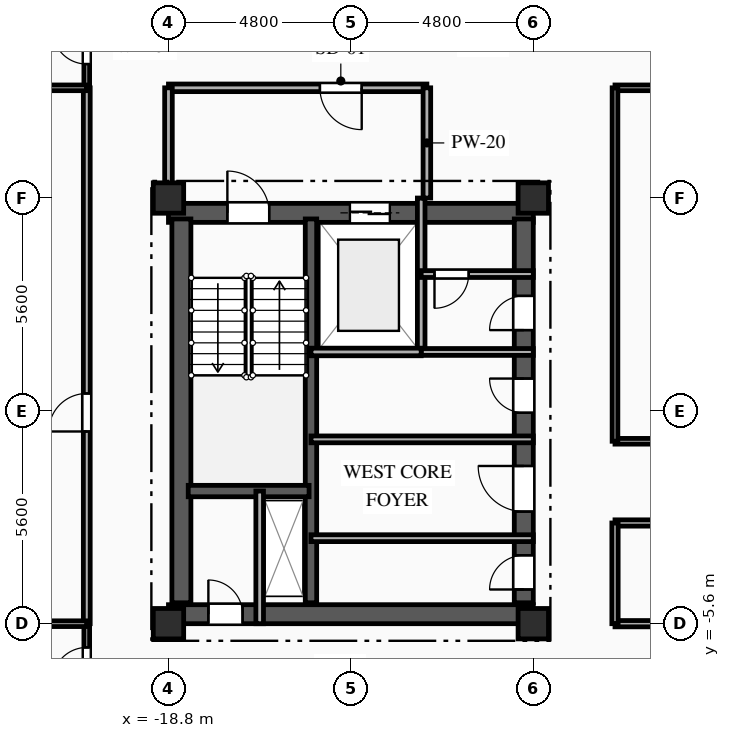
"""IFC4 building model, lengths in metres.
Left out: names, types, materials, properties, quantities, classifications, styles, units other than length and angle.
Written with IfcOpenShell. Run it as: python <this file> out.ifc"""

import sys

from ifc_helpers import new_model, si_unit, direction, frame, frame_2d, origin, origin_2d, place, context, subcontext, project, spatial, rectangle, extrude, element, fill, save


model = new_model("IFC4")
c1 = context("Model", 3, precision=1e-05, world=origin(), true_north=direction((0.0, 1.0)))
c2 = subcontext(c1, "Body", "Model", "MODEL_VIEW")
j1 = project(units=[si_unit("LENGTHUNIT", "METRE"), si_unit("PLANEANGLEUNIT", "RADIAN")], contexts=[c1])
p1 = place(None, origin())
s1 = spatial("IfcSite", under=j1, at=p1, CompositionType="ELEMENT")
p2 = place(p1, origin())
s2 = spatial("IfcBuilding", under=s1, at=p2, CompositionType="ELEMENT")
p3 = place(p2, frame((0.0, 0.0, 189.7)))
s3 = spatial("IfcBuildingStorey", under=s2, at=p3, CompositionType="ELEMENT", Elevation=189.7)
for number, where, z_axis, x_axis in (
    (1, (-18.8, -5.6, 0.0), (0.0, 0.0, 1.0), (1.0, 0.0, 0.0)),
    (2, (-18.8, 5.6, 0.0), (0.0, 0.0, 1.0), (1.0, 0.0, 0.0)),
    (3, (-9.2, -5.6, 0.0), (0.0, 0.0, 1.0), (1.0, 0.0, 0.0)),
    (4, (-9.2, 5.6, 0.0), (0.0, 0.0, 1.0), (1.0, 0.0, 0.0)),
):
    element("IfcColumn", number, at=place(p3, frame(where, z_axis=z_axis, x_axis=x_axis)), inside=s3, PredefinedType="COLUMN", context=c2, shape_type="SweptSolid", body=[
        extrude(rectangle(XDim=0.8, YDim=0.8, at=origin_2d()), origin(), (0.0, 0.0, 1.0), 3.35),
    ])
p4 = place(p3, frame((-18.8, 5.21, 0.0), z_axis=(0.0, 0.0, 1.0), x_axis=(1.0, 0.0, 0.0)))
e5 = element("IfcWall", 5, at=p4, inside=s3, PredefinedType="SHEAR", context=c2, shape_type="SweptSolid", body=[
    extrude(rectangle(XDim=9.6, YDim=0.5, at=frame_2d((4.8, 0.0))), origin(), (0.0, 0.0, 1.0), 3.04),
])
p5 = place(p4, frame((1.55, 0.0, 0.0)))
e6 = element("IfcOpeningElement", 6, at=p5, cuts=e5, PredefinedType="OPENING", context=c2, shape_type="SweptSolid", body=[
    extrude(rectangle(XDim=1.1, YDim=2.15, at=frame_2d((0.55, 1.075))), frame((0.0, 0.26, 0.0), z_axis=(0.0, -1.0, 0.0), x_axis=(1.0, 0.0, 0.0)), (0.0, 0.0, 1.0), 0.52),
])
p6 = place(p4, frame((4.775, 0.0, 0.0)))
e7 = element("IfcOpeningElement", 7, at=p6, cuts=e5, PredefinedType="OPENING", context=c2, shape_type="SweptSolid", body=[
    extrude(rectangle(XDim=1.05, YDim=2.1, at=frame_2d((0.525, 1.05))), frame((0.0, 0.26, 0.0), z_axis=(0.0, -1.0, 0.0), x_axis=(1.0, 0.0, 0.0)), (0.0, 0.0, 1.0), 0.52),
])
p7 = place(p3, frame((-18.8, -5.35, 0.0), z_axis=(0.0, 0.0, 1.0), x_axis=(1.0, 0.0, 0.0)))
e8 = element("IfcWall", 8, at=p7, inside=s3, PredefinedType="SHEAR", context=c2, shape_type="SweptSolid", body=[
    extrude(rectangle(XDim=9.6, YDim=0.5, at=frame_2d((4.8, 0.0))), origin(), (0.0, 0.0, 1.0), 3.04),
])
p8 = place(p7, frame((1.05, 0.0, 0.0)))
e9 = element("IfcOpeningElement", 9, at=p8, cuts=e8, PredefinedType="OPENING", context=c2, shape_type="SweptSolid", body=[
    extrude(rectangle(XDim=0.9, YDim=2.1, at=frame_2d((0.45, 1.05))), frame((0.0, 0.26, 0.0), z_axis=(0.0, -1.0, 0.0), x_axis=(1.0, 0.0, 0.0)), (0.0, 0.0, 1.0), 0.52),
])
p9 = place(p3, frame((-18.46, -5.05, 0.0), z_axis=(0.0, 0.0, 1.0), x_axis=(0.0, 1.0, 0.0)))
e10 = element("IfcWall", 10, at=p9, inside=s3, PredefinedType="SHEAR", context=c2, shape_type="SweptSolid", body=[
    extrude(rectangle(XDim=10.1, YDim=0.5, at=frame_2d((5.05, 0.0))), origin(), (0.0, 0.0, 1.0), 3.04),
])
p10 = place(p3, frame((-9.45, -5.05, 0.0), z_axis=(0.0, 0.0, 1.0), x_axis=(0.0, 1.0, 0.0)))
e11 = element("IfcWall", 11, at=p10, inside=s3, PredefinedType="SHEAR", context=c2, shape_type="SweptSolid", body=[
    extrude(rectangle(XDim=10.1, YDim=0.5, at=frame_2d((5.05, 0.0))), origin(), (0.0, 0.0, 1.0), 3.04),
])
p11 = place(p10, frame((7.175, 0.0, 0.0)))
e12 = element("IfcOpeningElement", 12, at=p11, cuts=e11, PredefinedType="OPENING", context=c2, shape_type="SweptSolid", body=[
    extrude(rectangle(XDim=0.9, YDim=2.1, at=frame_2d((0.45, 1.05))), frame((0.0, 0.26, 0.0), z_axis=(0.0, -1.0, 0.0), x_axis=(1.0, 0.0, 0.0)), (0.0, 0.0, 1.0), 0.52),
])
p12 = place(p10, frame((2.4, 0.0, 0.0)))
e13 = element("IfcOpeningElement", 13, at=p12, cuts=e11, PredefinedType="OPENING", context=c2, shape_type="SweptSolid", body=[
    extrude(rectangle(XDim=1.2, YDim=2.15, at=frame_2d((0.6, 1.075))), frame((0.0, 0.26, 0.0), z_axis=(0.0, -1.0, 0.0), x_axis=(1.0, 0.0, 0.0)), (0.0, 0.0, 1.0), 0.52),
])
p13 = place(p10, frame((0.35, 0.0, 0.0)))
e14 = element("IfcOpeningElement", 14, at=p13, cuts=e11, PredefinedType="OPENING", context=c2, shape_type="SweptSolid", body=[
    extrude(rectangle(XDim=0.9, YDim=2.1, at=frame_2d((0.45, 1.05))), frame((0.0, 0.26, 0.0), z_axis=(0.0, -1.0, 0.0), x_axis=(1.0, 0.0, 0.0)), (0.0, 0.0, 1.0), 0.52),
])
p14 = place(p10, frame((5.0, 0.0, 0.0)))
e15 = element("IfcOpeningElement", 15, at=p14, cuts=e11, PredefinedType="OPENING", context=c2, shape_type="SweptSolid", body=[
    extrude(rectangle(XDim=0.9, YDim=2.1, at=frame_2d((0.45, 1.05))), frame((0.0, 0.26, 0.0), z_axis=(0.0, -1.0, 0.0), x_axis=(1.0, 0.0, 0.0)), (0.0, 0.0, 1.0), 0.52),
])
p15 = place(p3, frame((-15.05, -5.05, 0.0), z_axis=(0.0, 0.0, 1.0), x_axis=(0.0, 1.0, 0.0)))
e16 = element("IfcWall", 16, at=p15, inside=s3, PredefinedType="SHEAR", context=c2, shape_type="SweptSolid", body=[
    extrude(rectangle(XDim=10.1, YDim=0.3, at=frame_2d((5.05, 0.0))), origin(), (0.0, 0.0, 1.0), 3.04),
])
p16 = place(p3, frame((-18.28, -2.11, 0.0), z_axis=(0.0, 0.0, 1.0), x_axis=(1.0, 0.0, 0.0)))
e17 = element("IfcWall", 17, at=p16, inside=s3, PredefinedType="SHEAR", context=c2, shape_type="SweptSolid", body=[
    extrude(rectangle(XDim=3.18, YDim=0.3, at=frame_2d((1.59, 0.0))), origin(), (0.0, 0.0, 1.0), 3.04),
])
p17 = place(p3, frame((-16.4, -5.6, 0.0), z_axis=(0.0, 0.0, 1.0), x_axis=(0.0, 1.0, 0.0)))
e18 = element("IfcWall", 18, at=p17, inside=s3, PredefinedType="PARTITIONING", context=c2, shape_type="SweptSolid", body=[
    extrude(rectangle(XDim=3.49, YDim=0.2, at=frame_2d((1.745, 0.0))), origin(), (0.0, 0.0, 1.0), 3.04),
])
p18 = place(p3, frame((-12.15, 1.55, 0.0), z_axis=(0.0, 0.0, 1.0), x_axis=(0.0, 1.0, 0.0)))
e19 = element("IfcWall", 19, at=p18, inside=s3, PredefinedType="PARTITIONING", context=c2, shape_type="SweptSolid", body=[
    extrude(rectangle(XDim=2.05, YDim=0.2, at=frame_2d((1.025, 0.0))), origin(), (0.0, 0.0, 1.0), 3.04),
])
p19 = place(p3, frame((-12.15, 3.6, 0.0), z_axis=(0.0, 0.0, 1.0), x_axis=(0.0, 1.0, 0.0)))
e20 = element("IfcWall", 20, at=p19, inside=s3, PredefinedType="PARTITIONING", context=c2, shape_type="SweptSolid", body=[
    extrude(rectangle(XDim=2.0, YDim=0.2, at=frame_2d((1.0, 0.0))), origin(), (0.0, 0.0, 1.0), 3.04),
])
p20 = place(p3, frame((-12.0, 8.5, 0.0), z_axis=(0.0, 0.0, 1.0), x_axis=(-1.0, 0.0, 0.0)))
e21 = element("IfcWall", 21, at=p20, inside=s3, PredefinedType="PARTITIONING", context=c2, shape_type="SweptSolid", body=[
    extrude(rectangle(XDim=6.8, YDim=0.2, at=frame_2d((3.4, 0.0))), origin(), (0.0, 0.0, 1.0), 3.04),
])
p21 = place(p20, frame((1.715, 0.0, 0.0)))
e22 = element("IfcOpeningElement", 22, at=p21, cuts=e21, PredefinedType="OPENING", context=c2, shape_type="SweptSolid", body=[
    extrude(rectangle(XDim=1.1, YDim=2.15, at=frame_2d((0.55, 1.075))), frame((0.0, 0.11, 0.0), z_axis=(0.0, -1.0, 0.0), x_axis=(1.0, 0.0, 0.0)), (0.0, 0.0, 1.0), 0.22),
])
p22 = place(p3, frame((-18.8, 8.5, 0.0), z_axis=(0.0, 0.0, 1.0), x_axis=(0.0, -1.0, 0.0)))
e23 = element("IfcWall", 23, at=p22, inside=s3, PredefinedType="PARTITIONING", context=c2, shape_type="SweptSolid", body=[
    extrude(rectangle(XDim=2.9, YDim=0.2, at=frame_2d((1.45, 0.0))), origin(), (0.0, 0.0, 1.0), 2.665),
])
p23 = place(p3, frame((-12.0, 5.6, 0.0), z_axis=(0.0, 0.0, 1.0), x_axis=(0.0, 1.0, 0.0)))
e24 = element("IfcWall", 24, at=p23, inside=s3, PredefinedType="PARTITIONING", context=c2, shape_type="SweptSolid", body=[
    extrude(rectangle(XDim=2.9, YDim=0.2, at=frame_2d((1.45, 0.0))), origin(), (0.0, 0.0, 1.0), 3.04),
])
p24 = place(p3, frame((-9.2, 3.6, 0.0), z_axis=(0.0, 0.0, 1.0), x_axis=(-1.0, 0.0, 0.0)))
e25 = element("IfcWall", 25, at=p24, inside=s3, PredefinedType="PARTITIONING", context=c2, shape_type="SweptSolid", body=[
    extrude(rectangle(XDim=2.95, YDim=0.18, at=frame_2d((1.475, 0.0))), origin(), (0.0, 0.0, 1.0), 3.04),
])
p25 = place(p24, frame((1.7, 0.0, 0.0)))
e26 = element("IfcOpeningElement", 26, at=p25, cuts=e25, PredefinedType="OPENING", context=c2, shape_type="SweptSolid", body=[
    extrude(rectangle(XDim=0.9, YDim=2.1, at=frame_2d((0.45, 1.05))), frame((0.0, 0.1, 0.0), z_axis=(0.0, -1.0, 0.0), x_axis=(1.0, 0.0, 0.0)), (0.0, 0.0, 1.0), 0.2),
])
p26 = place(p3, frame((-12.15, 1.55, 0.0), z_axis=(0.0, 0.0, 1.0), x_axis=(1.0, 0.0, 0.0)))
e27 = element("IfcWall", 27, at=p26, inside=s3, PredefinedType="PARTITIONING", context=c2, shape_type="SweptSolid", body=[
    extrude(rectangle(XDim=2.95, YDim=0.18, at=frame_2d((1.475, 0.0))), origin(), (0.0, 0.0, 1.0), 3.04),
])
p27 = place(p3, frame((-15.05, -3.35, 0.0), z_axis=(0.0, 0.0, 1.0), x_axis=(1.0, 0.0, 0.0)))
e28 = element("IfcWall", 28, at=p27, inside=s3, PredefinedType="PARTITIONING", context=c2, shape_type="SweptSolid", body=[
    extrude(rectangle(XDim=5.85, YDim=0.18, at=frame_2d((2.925, 0.0))), origin(), (0.0, 0.0, 1.0), 2.755),
])
p28 = place(p3, frame((-9.2, -0.75, 0.0), z_axis=(0.0, 0.0, 1.0), x_axis=(-1.0, 0.0, 0.0)))
e29 = element("IfcWall", 29, at=p28, inside=s3, PredefinedType="PARTITIONING", context=c2, shape_type="SweptSolid", body=[
    extrude(rectangle(XDim=5.85, YDim=0.18, at=frame_2d((2.925, 0.0))), origin(), (0.0, 0.0, 1.0), 3.04),
])
p29 = place(p3, frame((-20.95, 8.5, 0.0), z_axis=(0.0, 0.0, 1.0), x_axis=(0.0, 1.0, 0.0)))
e30 = element("IfcWall", 30, at=p29, inside=s3, PredefinedType="PARTITIONING", context=c2, shape_type="SweptSolid", body=[
    extrude(rectangle(XDim=2.15, YDim=0.15, at=frame_2d((1.075, 0.0))), origin(), (0.0, 0.0, 1.0), 3.04),
])
p30 = place(p29, frame((0.625, 0.0, 0.0)))
e31 = element("IfcOpeningElement", 31, at=p30, cuts=e30, PredefinedType="OPENING", context=c2, shape_type="SweptSolid", body=[
    extrude(rectangle(XDim=0.9, YDim=2.1, at=frame_2d((0.45, 1.05))), frame((0.0, 0.085, 0.0), z_axis=(0.0, -1.0, 0.0), x_axis=(1.0, 0.0, 0.0)), (0.0, 0.0, 1.0), 0.17),
])
p31 = place(p3, frame((0.0, 8.5, 0.0), z_axis=(0.0, 0.0, 1.0), x_axis=(-1.0, 0.0, 0.0)))
e32 = element("IfcWall", 32, at=p31, inside=s3, PredefinedType="PARTITIONING", context=c2, shape_type="SweptSolid", body=[
    extrude(rectangle(XDim=7.05, YDim=0.15, at=frame_2d((3.525, 0.0))), origin(), (0.0, 0.0, 1.0), 3.04),
])
p32 = place(p3, frame((-20.95, -7.75, 0.0), z_axis=(0.0, 0.0, 1.0), x_axis=(0.0, 1.0, 0.0)))
e33 = element("IfcWall", 33, at=p32, inside=s3, PredefinedType="PARTITIONING", context=c2, shape_type="SweptSolid", body=[
    extrude(rectangle(XDim=2.15, YDim=0.15, at=frame_2d((1.075, 0.0))), origin(), (0.0, 0.0, 1.0), 3.04),
])
p33 = place(p32, frame((0.625, 0.0, 0.0)))
e34 = element("IfcOpeningElement", 34, at=p33, cuts=e33, PredefinedType="OPENING", context=c2, shape_type="SweptSolid", body=[
    extrude(rectangle(XDim=0.9, YDim=2.1, at=frame_2d((0.45, 1.05))), frame((0.0, 0.085, 0.0), z_axis=(0.0, -1.0, 0.0), x_axis=(1.0, 0.0, 0.0)), (0.0, 0.0, 1.0), 0.17),
])
p34 = place(p3, frame((-7.05, -5.6, 0.0), z_axis=(0.0, 0.0, 1.0), x_axis=(1.0, 0.0, 0.0)))
e35 = element("IfcWall", 35, at=p34, inside=s3, PredefinedType="PARTITIONING", context=c2, shape_type="SweptSolid", body=[
    extrude(rectangle(XDim=7.05, YDim=0.165, at=frame_2d((3.525, 0.0))), origin(), (0.0, 0.0, 1.0), 2.525),
])
p35 = place(p34, frame((4.728, 0.0, 0.0)))
e36 = element("IfcOpeningElement", 36, at=p35, cuts=e35, PredefinedType="OPENING", context=c2, shape_type="SweptSolid", body=[
    extrude(rectangle(XDim=1.15, YDim=2.15, at=frame_2d((0.575, 1.075))), frame((0.0, 0.093, 0.0), z_axis=(0.0, -1.0, 0.0), x_axis=(1.0, 0.0, 0.0)), (0.0, 0.0, 1.0), 0.185),
])
p36 = place(p3, frame((-20.95, -5.6, 0.0), z_axis=(0.0, 0.0, 1.0), x_axis=(0.0, 1.0, 0.0)))
e37 = element("IfcWall", 37, at=p36, inside=s3, PredefinedType="PARTITIONING", context=c2, shape_type="SweptSolid", body=[
    extrude(rectangle(XDim=14.1, YDim=0.18, at=frame_2d((7.05, 0.0))), origin(), (0.0, 0.0, 1.0), 3.04),
])
p37 = place(p36, frame((5.058, 0.0, 0.0)))
e38 = element("IfcOpeningElement", 38, at=p37, cuts=e37, PredefinedType="OPENING", context=c2, shape_type="SweptSolid", body=[
    extrude(rectangle(XDim=1.0, YDim=2.15, at=frame_2d((0.5, 1.075))), frame((0.0, 0.1, 0.0), z_axis=(0.0, -1.0, 0.0), x_axis=(1.0, 0.0, 0.0)), (0.0, 0.0, 1.0), 0.2),
])
p38 = place(p3, frame((-7.05, -0.8, 0.0), z_axis=(0.0, 0.0, 1.0), x_axis=(1.0, 0.0, 0.0)))
e39 = element("IfcWall", 39, at=p38, inside=s3, PredefinedType="PARTITIONING", context=c2, shape_type="SweptSolid", body=[
    extrude(rectangle(XDim=14.1, YDim=0.15, at=frame_2d((7.05, 0.0))), origin(), (0.0, 0.0, 1.0), 3.04),
])
p39 = place(p38, frame((6.525, 0.0, 0.0)))
e40 = element("IfcOpeningElement", 40, at=p39, cuts=e39, PredefinedType="OPENING", context=c2, shape_type="SweptSolid", body=[
    extrude(rectangle(XDim=1.05, YDim=2.15, at=frame_2d((0.525, 1.075))), frame((0.0, 0.085, 0.0), z_axis=(0.0, -1.0, 0.0), x_axis=(1.0, 0.0, 0.0)), (0.0, 0.0, 1.0), 0.17),
])
p40 = place(p3, frame((0.0, -2.95, 0.0), z_axis=(0.0, 0.0, 1.0), x_axis=(-1.0, 0.0, 0.0)))
e41 = element("IfcWall", 41, at=p40, inside=s3, PredefinedType="PARTITIONING", context=c2, shape_type="SweptSolid", body=[
    extrude(rectangle(XDim=7.05, YDim=0.165, at=frame_2d((3.525, 0.0))), origin(), (0.0, 0.0, 1.0), 3.04),
])
p41 = place(p3, frame((-7.05, 8.5, 0.0), z_axis=(0.0, 0.0, 1.0), x_axis=(0.0, -1.0, 0.0)))
e42 = element("IfcWall", 42, at=p41, inside=s3, PredefinedType="PARTITIONING", context=c2, shape_type="SweptSolid", body=[
    extrude(rectangle(XDim=9.3, YDim=0.15, at=frame_2d((4.65, 0.0))), origin(), (0.0, 0.0, 1.0), 3.04),
])
p42 = place(p3, frame((-7.05, -2.95, 0.0), z_axis=(0.0, 0.0, 1.0), x_axis=(0.0, -1.0, 0.0)))
e43 = element("IfcWall", 43, at=p42, inside=s3, PredefinedType="PARTITIONING", context=c2, shape_type="SweptSolid", body=[
    extrude(rectangle(XDim=2.65, YDim=0.165, at=frame_2d((1.325, 0.0))), origin(), (0.0, 0.0, 1.0), 3.04),
])
p43 = place(p3, frame((-23.6, 8.5, 0.0), z_axis=(0.0, 0.0, 1.0), x_axis=(1.0, 0.0, 0.0)))
e44 = element("IfcWall", 44, at=p43, inside=s3, PredefinedType="PARTITIONING", context=c2, shape_type="SweptSolid", body=[
    extrude(rectangle(XDim=2.65, YDim=0.15, at=frame_2d((1.325, 0.0))), origin(), (0.0, 0.0, 1.0), 3.04),
])
p44 = place(p43, frame((0.635, 0.0, 0.0)))
e45 = element("IfcOpeningElement", 45, at=p44, cuts=e44, PredefinedType="OPENING", context=c2, shape_type="SweptSolid", body=[
    extrude(rectangle(XDim=1.05, YDim=2.15, at=frame_2d((0.525, 1.075))), frame((0.0, 0.085, 0.0), z_axis=(0.0, -1.0, 0.0), x_axis=(1.0, 0.0, 0.0)), (0.0, 0.0, 1.0), 0.17),
])
p45 = place(p3, frame((-20.95, -5.6, 0.0), z_axis=(0.0, 0.0, 1.0), x_axis=(-1.0, 0.0, 0.0)))
e46 = element("IfcWall", 46, at=p45, inside=s3, PredefinedType="PARTITIONING", context=c2, shape_type="SweptSolid", body=[
    extrude(rectangle(XDim=2.65, YDim=0.15, at=frame_2d((1.325, 0.0))), origin(), (0.0, 0.0, 1.0), 3.04),
])
p46 = place(p45, frame((0.965, 0.0, 0.0)))
e47 = element("IfcOpeningElement", 47, at=p46, cuts=e46, PredefinedType="OPENING", context=c2, shape_type="SweptSolid", body=[
    extrude(rectangle(XDim=1.05, YDim=2.15, at=frame_2d((0.525, 1.075))), frame((0.0, 0.085, 0.0), z_axis=(0.0, -1.0, 0.0), x_axis=(1.0, 0.0, 0.0)), (0.0, 0.0, 1.0), 0.17),
])
p47 = place(p3, frame((-15.05, 1.55, 0.0), z_axis=(0.0, 0.0, 1.0), x_axis=(1.0, 0.0, 0.0)))
e48 = element("IfcWall", 48, at=p47, inside=s3, PredefinedType="PARTITIONING", context=c2, shape_type="SweptSolid", body=[
    extrude(rectangle(XDim=2.9, YDim=0.2, at=frame_2d((1.45, 0.0))), origin(), (0.0, 0.0, 1.0), 3.04),
])
p48 = place(p5, origin())
e49 = element("IfcDoor", 49, at=p48, inside=s3, OperationType="SINGLE_SWING_LEFT", PredefinedType="DOOR", context=c2, shape_type="SweptSolid", body=[
    extrude(rectangle(XDim=1.1, YDim=2.15, at=frame_2d((0.55, 1.075))), frame((0.0, 0.025, 0.0), z_axis=(0.0, -1.0, 0.0), x_axis=(1.0, 0.0, 0.0)), (0.0, 0.0, 1.0), 0.05),
])
fill(e6, e49)
p49 = place(p6, origin())
e50 = element("IfcDoor", 50, at=p49, inside=s3, OperationType="DOUBLE_DOOR_SLIDING", PredefinedType="DOOR", context=c2, shape_type="SweptSolid", body=[
    extrude(rectangle(XDim=1.05, YDim=2.1, at=frame_2d((0.525, 1.05))), frame((0.0, 0.025, 0.0), z_axis=(0.0, -1.0, 0.0), x_axis=(1.0, 0.0, 0.0)), (0.0, 0.0, 1.0), 0.05),
])
fill(e7, e50)
p50 = place(p8, origin())
e51 = element("IfcDoor", 51, at=p50, inside=s3, OperationType="SINGLE_SWING_LEFT", PredefinedType="DOOR", context=c2, shape_type="SweptSolid", body=[
    extrude(rectangle(XDim=0.9, YDim=2.1, at=frame_2d((0.45, 1.05))), frame((0.0, 0.025, 0.0), z_axis=(0.0, -1.0, 0.0), x_axis=(1.0, 0.0, 0.0)), (0.0, 0.0, 1.0), 0.05),
])
fill(e9, e51)
p51 = place(p21, origin())
e52 = element("IfcDoor", 52, at=p51, inside=s3, OperationType="SINGLE_SWING_LEFT", PredefinedType="DOOR", context=c2, shape_type="SweptSolid", body=[
    extrude(rectangle(XDim=1.1, YDim=2.15, at=frame_2d((0.55, 1.075))), frame((0.0, 0.025, 0.0), z_axis=(0.0, -1.0, 0.0), x_axis=(1.0, 0.0, 0.0)), (0.0, 0.0, 1.0), 0.05),
])
fill(e22, e52)
p52 = place(p25, origin())
e53 = element("IfcDoor", 53, at=p52, inside=s3, OperationType="SINGLE_SWING_RIGHT", PredefinedType="DOOR", context=c2, shape_type="SweptSolid", body=[
    extrude(rectangle(XDim=0.9, YDim=2.1, at=frame_2d((0.45, 1.05))), frame((0.0, 0.025, 0.0), z_axis=(0.0, -1.0, 0.0), x_axis=(1.0, 0.0, 0.0)), (0.0, 0.0, 1.0), 0.05),
])
fill(e26, e53)
p53 = place(p11, origin())
e54 = element("IfcDoor", 54, at=p53, inside=s3, OperationType="SINGLE_SWING_LEFT", PredefinedType="DOOR", context=c2, shape_type="SweptSolid", body=[
    extrude(rectangle(XDim=0.9, YDim=2.1, at=frame_2d((0.45, 1.05))), frame((0.0, 0.025, 0.0), z_axis=(0.0, -1.0, 0.0), x_axis=(1.0, 0.0, 0.0)), (0.0, 0.0, 1.0), 0.05),
])
fill(e12, e54)
p54 = place(p12, origin())
e55 = element("IfcDoor", 55, at=p54, inside=s3, OperationType="SINGLE_SWING_RIGHT", PredefinedType="DOOR", context=c2, shape_type="SweptSolid", body=[
    extrude(rectangle(XDim=1.2, YDim=2.15, at=frame_2d((0.6, 1.075))), frame((0.0, 0.025, 0.0), z_axis=(0.0, -1.0, 0.0), x_axis=(1.0, 0.0, 0.0)), (0.0, 0.0, 1.0), 0.05),
])
fill(e13, e55)
p55 = place(p13, origin())
e56 = element("IfcDoor", 56, at=p55, inside=s3, OperationType="SINGLE_SWING_LEFT", PredefinedType="DOOR", context=c2, shape_type="SweptSolid", body=[
    extrude(rectangle(XDim=0.9, YDim=2.1, at=frame_2d((0.45, 1.05))), frame((0.0, 0.025, 0.0), z_axis=(0.0, -1.0, 0.0), x_axis=(1.0, 0.0, 0.0)), (0.0, 0.0, 1.0), 0.05),
])
fill(e14, e56)
p56 = place(p14, origin())
e57 = element("IfcDoor", 57, at=p56, inside=s3, OperationType="SINGLE_SWING_RIGHT", PredefinedType="DOOR", context=c2, shape_type="SweptSolid", body=[
    extrude(rectangle(XDim=0.9, YDim=2.1, at=frame_2d((0.45, 1.05))), frame((0.0, 0.025, 0.0), z_axis=(0.0, -1.0, 0.0), x_axis=(1.0, 0.0, 0.0)), (0.0, 0.0, 1.0), 0.05),
])
fill(e15, e57)
p57 = place(p30, origin())
e58 = element("IfcDoor", 58, at=p57, inside=s3, OperationType="SINGLE_SWING_RIGHT", PredefinedType="DOOR", context=c2, shape_type="SweptSolid", body=[
    extrude(rectangle(XDim=0.9, YDim=2.1, at=frame_2d((0.45, 1.05))), frame((0.0, 0.025, 0.0), z_axis=(0.0, -1.0, 0.0), x_axis=(1.0, 0.0, 0.0)), (0.0, 0.0, 1.0), 0.05),
])
fill(e31, e58)
p58 = place(p33, origin())
e59 = element("IfcDoor", 59, at=p58, inside=s3, OperationType="SINGLE_SWING_LEFT", PredefinedType="DOOR", context=c2, shape_type="SweptSolid", body=[
    extrude(rectangle(XDim=0.9, YDim=2.1, at=frame_2d((0.45, 1.05))), frame((0.0, 0.025, 0.0), z_axis=(0.0, -1.0, 0.0), x_axis=(1.0, 0.0, 0.0)), (0.0, 0.0, 1.0), 0.05),
])
fill(e34, e59)
p59 = place(p37, origin())
e60 = element("IfcDoor", 60, at=p59, inside=s3, OperationType="SINGLE_SWING_LEFT", PredefinedType="DOOR", context=c2, shape_type="SweptSolid", body=[
    extrude(rectangle(XDim=1.0, YDim=2.15, at=frame_2d((0.5, 1.075))), frame((0.0, 0.025, 0.0), z_axis=(0.0, -1.0, 0.0), x_axis=(1.0, 0.0, 0.0)), (0.0, 0.0, 1.0), 0.05),
])
fill(e38, e60)
save(model, sys.argv[1])
